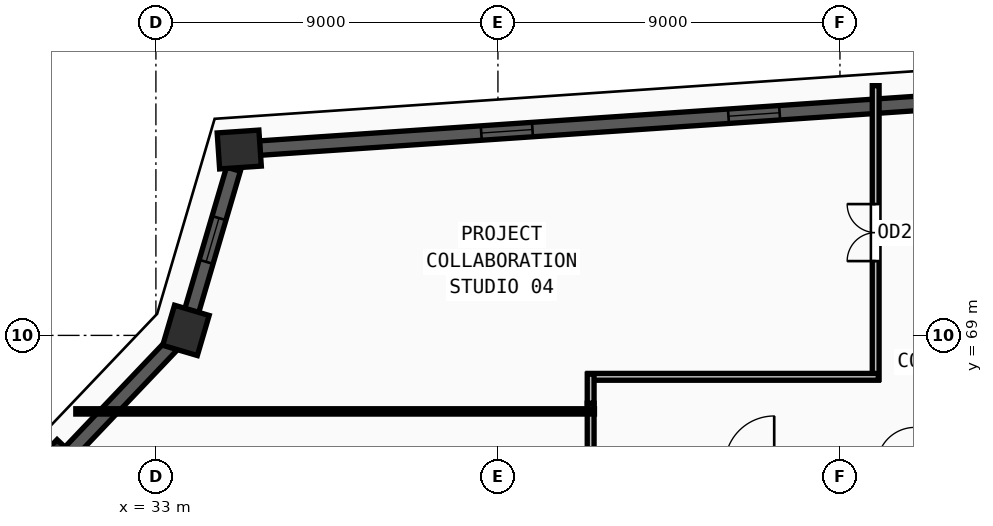
"""IFC4 building model, lengths in metres.
Left out: names, types, materials, properties, quantities, classifications, styles, units other than length and angle.
Written with IfcOpenShell. Run it as: python <this file> out.ifc"""

import sys

from ifc_helpers import new_model, si_unit, direction, frame, frame_2d, origin, origin_2d, place, context, subcontext, project, spatial, rectangle, extrude, source, transform, mapped, element, fill, save


model = new_model("IFC4")
c1 = context("Model", 3, precision=1e-05, world=origin(), true_north=direction((0.0, 1.0)))
c2 = subcontext(c1, "Body", "Model", "MODEL_VIEW")
j1 = project(units=[si_unit("LENGTHUNIT", "METRE"), si_unit("PLANEANGLEUNIT", "RADIAN")], contexts=[c1])
p1 = place(None, origin())
s1 = spatial("IfcSite", under=j1, at=p1, CompositionType="ELEMENT")
p2 = place(p1, origin())
s2 = spatial("IfcBuilding", under=s1, at=p2, CompositionType="ELEMENT")
p3 = place(p2, frame((0.0, 0.0, 320.25)))
s3 = spatial("IfcBuildingStorey", under=s2, at=p3, CompositionType="ELEMENT", Elevation=320.25)
m1 = source(origin(), c2, "Body", "SweptSolid", [
    extrude(rectangle(XDim=1.1, YDim=0.95, at=origin_2d()), origin(), (0.0, 0.0, 1.0), 3.75),
])
for number, where, z_axis, x_axis in (
    (1, (30.364, 65.532, 0.0), (0.0, 0.0, 1.0), (0.689, 0.724, 0.0)),
    (2, (33.79, 69.132, 0.0), (0.0, 0.0, 1.0), (0.283, 0.959, 0.0)),
    (3, (35.193, 73.891, 0.0), (0.0, 0.0, 1.0), (0.998, 0.068, 0.0)),
):
    element("IfcColumn", number, at=place(p3, frame(where, z_axis=z_axis, x_axis=x_axis)), inside=s3, PredefinedType="COLUMN", context=c2, shape_type="MappedRepresentation", body=[
        mapped(m1, transform((0.0, 0.0, 0.0), x_axis=(1.0, 0.0, 0.0), y_axis=(0.0, 1.0, 0.0), z_axis=(0.0, 0.0, 1.0), scale=1.0)),
    ])
p4 = place(p3, frame((61.746, 75.697, 0.0), z_axis=(0.0, 0.0, 1.0), x_axis=(-0.997695779362, -0.067846384155, 0.0)))
e4 = element("IfcWall", 4, at=p4, inside=s3, PredefinedType="SOLIDWALL", context=c2, shape_type="SweptSolid", body=[
    extrude(rectangle(XDim=26.074, YDim=0.38, at=frame_2d((13.037, 0.0))), origin(), (0.0, 0.0, 1.0), 3.47),
])
m2 = source(origin(), c2, "Body", "SweptSolid", [
    extrude(rectangle(XDim=1.35, YDim=1.85, at=frame_2d((0.675, 0.925))), frame((0.0, 0.2, 0.0), z_axis=(0.0, -1.0, 0.0), x_axis=(1.0, 0.0, 0.0)), (0.0, 0.0, 1.0), 0.4),
])
p5 = place(p4, frame((4.994, 0.0, 0.55)))
e5 = element("IfcOpeningElement", 5, at=p5, cuts=e4, PredefinedType="OPENING", context=c2, shape_type="MappedRepresentation", body=[
    mapped(m2, transform((0.0, 0.0, 0.0), x_axis=(1.0, 0.0, 0.0), y_axis=(0.0, 1.0, 0.0), z_axis=(0.0, 0.0, 1.0), scale=1.0)),
])
p6 = place(p4, frame((12.362, 0.0, 0.55)))
e6 = element("IfcOpeningElement", 6, at=p6, cuts=e4, PredefinedType="OPENING", context=c2, shape_type="MappedRepresentation", body=[
    mapped(m2, transform((0.0, 0.0, 0.0), x_axis=(1.0, 0.0, 0.0), y_axis=(0.0, 1.0, 0.0), z_axis=(0.0, 0.0, 1.0), scale=1.0)),
])
p7 = place(p4, frame((18.881, 0.0, 0.55)))
e7 = element("IfcOpeningElement", 7, at=p7, cuts=e4, PredefinedType="OPENING", context=c2, shape_type="MappedRepresentation", body=[
    mapped(m2, transform((0.0, 0.0, 0.0), x_axis=(1.0, 0.0, 0.0), y_axis=(0.0, 1.0, 0.0), z_axis=(0.0, 0.0, 1.0), scale=1.0)),
])
p8 = place(p3, frame((35.04, 73.373, 0.0), z_axis=(0.0, 0.0, 1.0), x_axis=(-0.282612406993, -0.959234187992, 0.0)))
e8 = element("IfcWall", 8, at=p8, inside=s3, PredefinedType="SOLIDWALL", context=c2, shape_type="SweptSolid", body=[
    extrude(rectangle(XDim=3.881, YDim=0.38, at=frame_2d((1.941, 0.0))), origin(), (0.0, 0.0, 1.0), 3.47),
])
m3 = source(origin(), c2, "Body", "SweptSolid", [
    extrude(rectangle(XDim=1.2, YDim=1.9, at=frame_2d((0.6, 0.95))), frame((0.0, 0.2, 0.0), z_axis=(0.0, -1.0, 0.0), x_axis=(1.0, 0.0, 0.0)), (0.0, 0.0, 1.0), 0.4),
])
p9 = place(p8, frame((1.341, 0.0, 0.55)))
e9 = element("IfcOpeningElement", 9, at=p9, cuts=e8, PredefinedType="OPENING", context=c2, shape_type="MappedRepresentation", body=[
    mapped(m3, transform((0.0, 0.0, 0.0), x_axis=(1.0, 0.0, 0.0), y_axis=(0.0, 1.0, 0.0), z_axis=(0.0, 0.0, 1.0), scale=1.0)),
])
p10 = place(p3, frame((33.418, 68.741, 0.0), z_axis=(0.0, 0.0, 1.0), x_axis=(-0.689412230032, -0.72436922704, 0.0)))
e10 = element("IfcWall", 10, at=p10, inside=s3, PredefinedType="SOLIDWALL", context=c2, shape_type="SweptSolid", body=[
    extrude(rectangle(XDim=3.89, YDim=0.38, at=frame_2d((1.945, 0.0))), origin(), (0.0, 0.0, 1.0), 3.47),
])
p11 = place(p3, frame((51.94, 67.84, 0.0), z_axis=(0.0, 0.0, 1.0), x_axis=(0.0, 1.0, 0.0)))
e11 = element("IfcWall", 11, at=p11, inside=s3, PredefinedType="PARTITIONING", context=c2, shape_type="SweptSolid", body=[
    extrude(rectangle(XDim=7.731, YDim=0.18, at=frame_2d((3.865, 0.0))), origin(), (0.0, 0.0, 1.0), 3.47),
])
m4 = source(origin(), c2, "Body", "SweptSolid", [
    extrude(rectangle(XDim=1.5, YDim=2.2, at=frame_2d((0.75, 1.1))), frame((0.0, 0.1, 0.0), z_axis=(0.0, -1.0, 0.0), x_axis=(1.0, 0.0, 0.0)), (0.0, 0.0, 1.0), 0.2),
])
p12 = place(p11, frame((3.115, 0.0, 0.0)))
e12 = element("IfcOpeningElement", 12, at=p12, cuts=e11, PredefinedType="OPENING", context=c2, shape_type="MappedRepresentation", body=[
    mapped(m4, transform((0.0, 0.0, 0.0), x_axis=(1.0, 0.0, 0.0), y_axis=(0.0, 1.0, 0.0), z_axis=(0.0, 0.0, 1.0), scale=1.0)),
])
p13 = place(p3, frame((44.44, 58.785, 0.0), z_axis=(0.0, 0.0, 1.0), x_axis=(0.0, 1.0, 0.0)))
e13 = element("IfcWall", 13, at=p13, inside=s3, PredefinedType="PARTITIONING", context=c2, shape_type="SweptSolid", body=[
    extrude(rectangle(XDim=8.43, YDim=0.18, at=frame_2d((4.215, 0.0))), origin(), (0.0, 0.0, 1.0), 3.47),
])
m5 = source(origin(), c2, "Body", "SweptSolid", [
    extrude(rectangle(XDim=1.0, YDim=2.2, at=frame_2d((0.5, 1.1))), frame((0.0, 0.1, 0.0), z_axis=(0.0, -1.0, 0.0), x_axis=(1.0, 0.0, 0.0)), (0.0, 0.0, 1.0), 0.2),
])
p14 = place(p13, frame((3.715, 0.0, 0.0)))
e14 = element("IfcOpeningElement", 14, at=p14, cuts=e13, PredefinedType="OPENING", context=c2, shape_type="MappedRepresentation", body=[
    mapped(m5, transform((0.0, 0.0, 0.0), x_axis=(1.0, 0.0, 0.0), y_axis=(0.0, 1.0, 0.0), z_axis=(0.0, 0.0, 1.0), scale=1.0)),
])
p15 = place(p3, frame((44.37, 67.91, 0.0), z_axis=(0.0, 0.0, 1.0), x_axis=(1.0, 0.0, 0.0)))
e15 = element("IfcWall", 15, at=p15, inside=s3, PredefinedType="PARTITIONING", context=c2, shape_type="SweptSolid", body=[
    extrude(rectangle(XDim=7.64, YDim=0.18, at=frame_2d((3.82, 0.0))), origin(), (0.0, 0.0, 1.0), 3.47),
])
p16 = place(p3, frame((44.44, 67.215, 0.0), z_axis=(0.0, 0.0, 1.0), x_axis=(0.0, 1.0, 0.0)))
e16 = element("IfcWall", 16, at=p16, inside=s3, PredefinedType="PARTITIONING", context=c2, shape_type="SweptSolid", body=[
    extrude(rectangle(XDim=0.765, YDim=0.18, at=frame_2d((0.382, 0.0))), origin(), (0.0, 0.0, 1.0), 3.47),
])
p17 = place(p3, frame((44.54, 67.0, 0.0), z_axis=(0.0, 0.0, 1.0), x_axis=(-1.0, 0.0, 0.0)))
e17 = element("IfcWall", 17, at=p17, inside=s3, PredefinedType="PARTITIONING", context=c2, shape_type="SweptSolid", body=[
    extrude(rectangle(XDim=13.648, YDim=0.14, at=frame_2d((6.824, 0.0))), origin(), (0.0, 0.0, 1.0), 3.161),
])
m6 = source(origin(), c2, "Body", "SweptSolid", [
    extrude(rectangle(XDim=1.35, YDim=1.85, at=frame_2d((0.675, 0.925))), frame((0.0, 0.03, 0.0), z_axis=(0.0, -1.0, 0.0), x_axis=(1.0, 0.0, 0.0)), (0.0, 0.0, 1.0), 0.06),
])
p18 = place(p6, origin())
e18 = element("IfcWindow", 18, at=p18, inside=s3, PartitioningType="SINGLE_PANEL", PredefinedType="WINDOW", context=c2, shape_type="MappedRepresentation", body=[
    mapped(m6, transform((0.0, 0.0, 0.0), x_axis=(1.0, 0.0, 0.0), y_axis=(0.0, 1.0, 0.0), z_axis=(0.0, 0.0, 1.0), scale=1.0)),
])
fill(e6, e18)
p19 = place(p7, origin())
e19 = element("IfcWindow", 19, at=p19, inside=s3, PartitioningType="SINGLE_PANEL", PredefinedType="WINDOW", context=c2, shape_type="MappedRepresentation", body=[
    mapped(m6, transform((0.0, 0.0, 0.0), x_axis=(1.0, 0.0, 0.0), y_axis=(0.0, 1.0, 0.0), z_axis=(0.0, 0.0, 1.0), scale=1.0)),
])
fill(e7, e19)
m7 = source(origin(), c2, "Body", "SweptSolid", [
    extrude(rectangle(XDim=1.2, YDim=1.9, at=frame_2d((0.6, 0.95))), frame((0.0, 0.03, 0.0), z_axis=(0.0, -1.0, 0.0), x_axis=(1.0, 0.0, 0.0)), (0.0, 0.0, 1.0), 0.06),
])
p20 = place(p9, origin())
e20 = element("IfcWindow", 20, at=p20, inside=s3, PartitioningType="SINGLE_PANEL", PredefinedType="WINDOW", context=c2, shape_type="MappedRepresentation", body=[
    mapped(m7, transform((0.0, 0.0, 0.0), x_axis=(1.0, 0.0, 0.0), y_axis=(0.0, 1.0, 0.0), z_axis=(0.0, 0.0, 1.0), scale=1.0)),
])
fill(e9, e20)
m8 = source(origin(), c2, "Body", "SweptSolid", [
    extrude(rectangle(XDim=1.5, YDim=2.2, at=frame_2d((0.75, 1.1))), frame((0.0, 0.025, 0.0), z_axis=(0.0, -1.0, 0.0), x_axis=(1.0, 0.0, 0.0)), (0.0, 0.0, 1.0), 0.05),
])
p21 = place(p12, origin())
e21 = element("IfcDoor", 21, at=p21, inside=s3, OperationType="DOUBLE_DOOR_SINGLE_SWING", PredefinedType="DOOR", context=c2, shape_type="MappedRepresentation", body=[
    mapped(m8, transform((0.0, 0.0, 0.0), x_axis=(1.0, 0.0, 0.0), y_axis=(0.0, 1.0, 0.0), z_axis=(0.0, 0.0, 1.0), scale=1.0)),
])
fill(e12, e21)
save(model, sys.argv[1])
